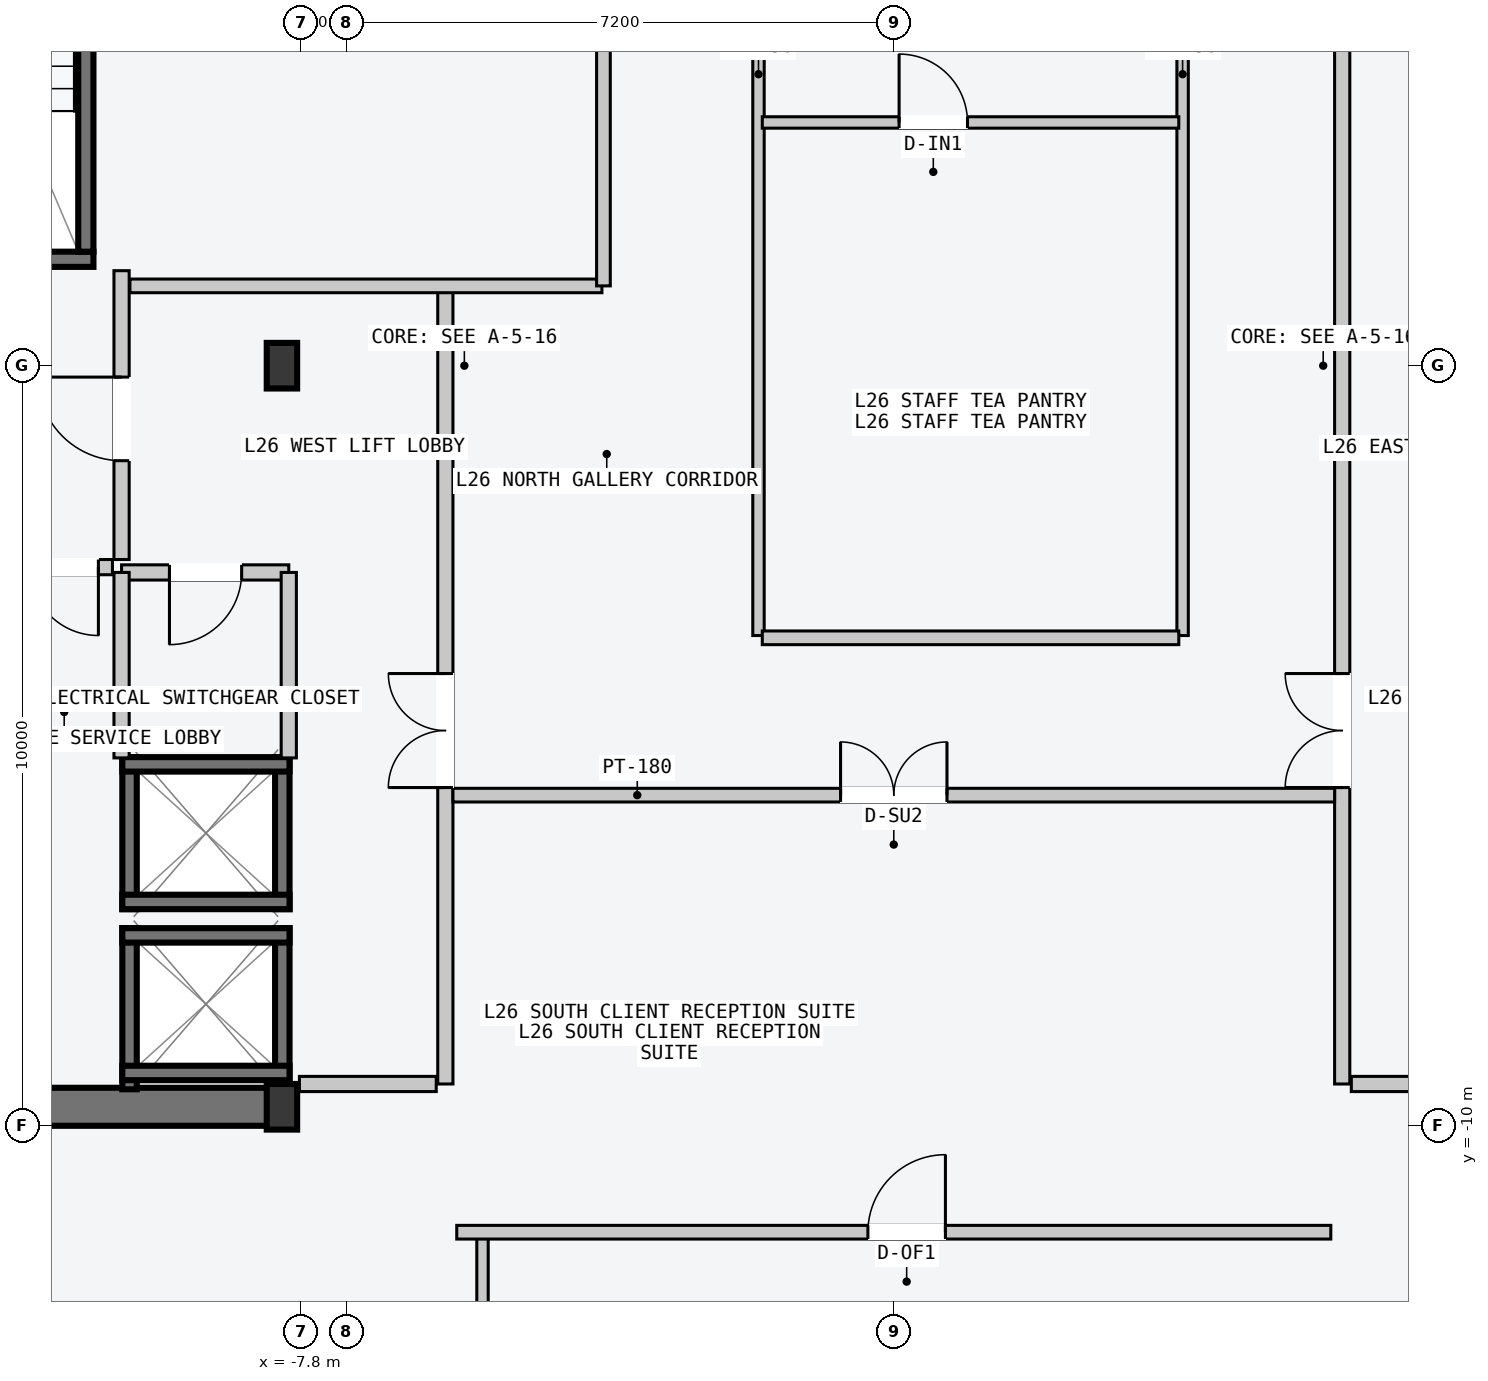
"""IFC4 building model, lengths in metres.
Left out: names, types, materials, properties, quantities, classifications, styles, units other than length and angle.
Written with IfcOpenShell. Run it as: python <this file> out.ifc"""

import sys

from ifc_helpers import new_model, si_unit, direction, frame, frame_2d, origin, origin_2d, place, context, subcontext, project, spatial, rectangle, i_section, extrude, element, fill, save


model = new_model("IFC4")
c1 = context("Model", 3, precision=1e-05, world=origin(), true_north=direction((0.0, 1.0)))
c2 = subcontext(c1, "Body", "Model", "MODEL_VIEW")
j1 = project(units=[si_unit("LENGTHUNIT", "METRE"), si_unit("PLANEANGLEUNIT", "RADIAN")], contexts=[c1])
p1 = place(None, origin())
s1 = spatial("IfcSite", under=j1, at=p1, CompositionType="ELEMENT")
p2 = place(p1, origin())
s2 = spatial("IfcBuilding", under=s1, at=p2, CompositionType="ELEMENT")
p3 = place(p2, frame((0.0, 0.0, 102.6)))
s3 = spatial("IfcBuildingStorey", under=s2, at=p3, CompositionType="ELEMENT", Elevation=102.6)
p4 = place(p3, frame((-14.53, -9.75, -0.2), z_axis=(0.0, 0.0, 1.0), x_axis=(1.0, 0.0, 0.0)))
e1 = element("IfcWall", 1, at=p4, inside=s3, PredefinedType="SHEAR", context=c2, shape_type="SweptSolid", body=[
    extrude(rectangle(XDim=6.46, YDim=0.5, at=frame_2d((3.23, 0.0))), origin(), (0.0, 0.0, 1.0), 3.6),
])
p5 = place(p3, frame((-14.25, 1.4, -0.2), z_axis=(0.0, 0.0, 1.0), x_axis=(1.0, 0.0, 0.0)))
e2 = element("IfcWall", 2, at=p5, inside=s3, PredefinedType="SOLIDWALL", context=c2, shape_type="SweptSolid", body=[
    extrude(rectangle(XDim=3.72, YDim=0.2, at=frame_2d((1.86, 0.0))), origin(), (0.0, 0.0, 1.0), 3.6),
])
p6 = place(p5, frame((1.5, 0.0, 0.2)))
e3 = element("IfcOpeningElement", 3, at=p6, cuts=e2, PredefinedType="OPENING", context=c2, shape_type="SweptSolid", body=[
    extrude(rectangle(XDim=1.12, YDim=2.18, at=frame_2d((0.56, 1.09))), frame((0.0, 0.11, 0.0), z_axis=(0.0, -1.0, 0.0), x_axis=(1.0, 0.0, 0.0)), (0.0, 0.0, 1.0), 0.22),
])
p7 = place(p3, frame((-10.63, 1.5, -0.2), z_axis=(0.0, 0.0, 1.0), x_axis=(0.0, 1.0, 0.0)))
e4 = element("IfcWall", 4, at=p7, inside=s3, PredefinedType="SOLIDWALL", context=c2, shape_type="SweptSolid", body=[
    extrude(rectangle(XDim=7.8, YDim=0.2, at=frame_2d((3.9, 0.0))), origin(), (0.0, 0.0, 1.0), 3.6),
])
for number, where, z_axis, x_axis in (
    (5, (-8.05, -9.75, 0.0), (0.0, 0.0, 1.0), (1.0, 0.0, 0.0)),
    (6, (-8.05, 0.0, 0.0), (0.0, 0.0, 1.0), (1.0, 0.0, 0.0)),
):
    element("IfcColumn", number, at=place(p3, frame(where, z_axis=z_axis, x_axis=x_axis)), inside=s3, PredefinedType="COLUMN", context=c2, shape_type="SweptSolid", body=[
        extrude(i_section(OverallWidth=0.4, OverallDepth=0.6, WebThickness=0.022, FlangeThickness=0.036, at=origin_2d()), origin(), (0.0, 0.0, 1.0), 3.6),
    ])
for number, where, z_axis, x_axis in (
    (7, (-8.045, -9.52, -0.2), (0.0, 0.0, 1.0), (0.0, 1.0, 0.0)),
    (8, (-10.055, -9.52, -0.2), (0.0, 0.0, 1.0), (0.0, 1.0, 0.0)),
):
    element("IfcWall", number, at=place(p3, frame(where, z_axis=z_axis, x_axis=x_axis)), inside=s3, PredefinedType="SOLIDWALL", context=c2, shape_type="SweptSolid", body=[
        extrude(rectangle(XDim=2.12, YDim=0.19, at=frame_2d((1.06, 0.0))), origin(), (0.0, 0.0, 1.0), 3.6),
    ])
for number, where, z_axis, x_axis in (
    (9, (-10.15, -7.495, -0.2), (0.0, 0.0, 1.0), (1.0, 0.0, 0.0)),
    (10, (-10.15, -9.305, -0.2), (0.0, 0.0, 1.0), (1.0, 0.0, 0.0)),
):
    element("IfcWall", number, at=place(p3, frame(where, z_axis=z_axis, x_axis=x_axis)), inside=s3, PredefinedType="SOLIDWALL", context=c2, shape_type="SweptSolid", body=[
        extrude(rectangle(XDim=2.2, YDim=0.19, at=frame_2d((1.1, 0.0))), origin(), (0.0, 0.0, 1.0), 3.6),
    ])
for number, where, z_axis, x_axis in (
    (11, (-8.045, -7.15, -0.2), (0.0, 0.0, 1.0), (0.0, 1.0, 0.0)),
    (12, (-10.055, -7.15, -0.2), (0.0, 0.0, 1.0), (0.0, 1.0, 0.0)),
):
    element("IfcWall", number, at=place(p3, frame(where, z_axis=z_axis, x_axis=x_axis)), inside=s3, PredefinedType="SOLIDWALL", context=c2, shape_type="SweptSolid", body=[
        extrude(rectangle(XDim=2.0, YDim=0.19, at=frame_2d((1.0, 0.0))), origin(), (0.0, 0.0, 1.0), 3.6),
    ])
for number, where, z_axis, x_axis in (
    (13, (-10.15, -5.245, -0.2), (0.0, 0.0, 1.0), (1.0, 0.0, 0.0)),
    (14, (-10.15, -7.055, -0.2), (0.0, 0.0, 1.0), (1.0, 0.0, 0.0)),
):
    element("IfcWall", number, at=place(p3, frame(where, z_axis=z_axis, x_axis=x_axis)), inside=s3, PredefinedType="SOLIDWALL", context=c2, shape_type="SweptSolid", body=[
        extrude(rectangle(XDim=2.2, YDim=0.19, at=frame_2d((1.1, 0.0))), origin(), (0.0, 0.0, 1.0), 3.6),
    ])
p8 = place(p3, frame((-5.9, -9.45, 0.0), z_axis=(0.0, 0.0, 1.0), x_axis=(0.0, 1.0, 0.0)))
e15 = element("IfcWall", 15, at=p8, inside=s3, PredefinedType="PARTITIONING", context=c2, shape_type="SweptSolid", body=[
    extrude(rectangle(XDim=10.5, YDim=0.2, at=frame_2d((5.25, 0.0))), origin(), (0.0, 0.0, 1.0), 3.4),
])
p9 = place(p8, frame((3.9, 0.0, 0.0)))
e16 = element("IfcOpeningElement", 16, at=p9, cuts=e15, PredefinedType="OPENING", context=c2, shape_type="SweptSolid", body=[
    extrude(rectangle(XDim=1.5, YDim=2.2, at=frame_2d((0.75, 1.1))), frame((0.0, 0.11, 0.0), z_axis=(0.0, -1.0, 0.0), x_axis=(1.0, 0.0, 0.0)), (0.0, 0.0, 1.0), 0.22),
])
p10 = place(p3, frame((-6.02, -9.45, 0.0), z_axis=(0.0, 0.0, 1.0), x_axis=(-1.0, 0.0, 0.0)))
e17 = element("IfcWall", 17, at=p10, inside=s3, PredefinedType="PARTITIONING", context=c2, shape_type="SweptSolid", body=[
    extrude(rectangle(XDim=1.8, YDim=0.2, at=frame_2d((0.9, 0.0))), origin(), (0.0, 0.0, 1.0), 3.4),
])
p11 = place(p3, frame((-10.16, -2.55, 0.0), z_axis=(0.0, 0.0, 1.0), x_axis=(0.0, 1.0, 0.0)))
e18 = element("IfcWall", 18, at=p11, inside=s3, PredefinedType="PARTITIONING", context=c2, shape_type="SweptSolid", body=[
    extrude(rectangle(XDim=3.8, YDim=0.2, at=frame_2d((1.9, 0.0))), origin(), (0.0, 0.0, 1.0), 3.4),
])
p12 = place(p11, frame((1.3, 0.0, 0.0)))
e19 = element("IfcOpeningElement", 19, at=p12, cuts=e18, PredefinedType="OPENING", context=c2, shape_type="SweptSolid", body=[
    extrude(rectangle(XDim=1.1, YDim=2.15, at=frame_2d((0.55, 1.075))), frame((0.0, 0.11, 0.0), z_axis=(0.0, -1.0, 0.0), x_axis=(1.0, 0.0, 0.0)), (0.0, 0.0, 1.0), 0.22),
])
p13 = place(p3, frame((-10.28, -2.65, 0.0), z_axis=(0.0, 0.0, 1.0), x_axis=(-1.0, 0.0, 0.0)))
e20 = element("IfcWall", 20, at=p13, inside=s3, PredefinedType="PARTITIONING", context=c2, shape_type="SweptSolid", body=[
    extrude(rectangle(XDim=1.27, YDim=0.2, at=frame_2d((0.635, 0.0))), origin(), (0.0, 0.0, 1.0), 3.4),
])
p14 = place(p13, frame((0.185, 0.0, 0.0)))
e21 = element("IfcOpeningElement", 21, at=p14, cuts=e20, PredefinedType="OPENING", context=c2, shape_type="SweptSolid", body=[
    extrude(rectangle(XDim=0.9, YDim=2.15, at=frame_2d((0.45, 1.075))), frame((0.0, 0.11, 0.0), z_axis=(0.0, -1.0, 0.0), x_axis=(1.0, 0.0, 0.0)), (0.0, 0.0, 1.0), 0.22),
])
p15 = place(p3, frame((-7.96, -2.72, 0.0), z_axis=(0.0, 0.0, 1.0), x_axis=(-1.0, 0.0, 0.0)))
e22 = element("IfcWall", 22, at=p15, inside=s3, PredefinedType="PARTITIONING", context=c2, shape_type="SweptSolid", body=[
    extrude(rectangle(XDim=2.2, YDim=0.2, at=frame_2d((1.1, 0.0))), origin(), (0.0, 0.0, 1.0), 3.4),
])
p16 = place(p15, frame((0.62, 0.0, 0.0)))
e23 = element("IfcOpeningElement", 23, at=p16, cuts=e22, PredefinedType="OPENING", context=c2, shape_type="SweptSolid", body=[
    extrude(rectangle(XDim=0.95, YDim=2.1, at=frame_2d((0.475, 1.05))), frame((0.0, 0.11, 0.0), z_axis=(0.0, -1.0, 0.0), x_axis=(1.0, 0.0, 0.0)), (0.0, 0.0, 1.0), 0.22),
])
for number, where, z_axis, x_axis in (
    (24, (-7.96, -5.16, 0.0), (0.0, 0.0, 1.0), (0.0, 1.0, 0.0)),
    (25, (-10.16, -5.16, 0.0), (0.0, 0.0, 1.0), (0.0, 1.0, 0.0)),
):
    element("IfcWall", number, at=place(p3, frame(where, z_axis=z_axis, x_axis=x_axis)), inside=s3, PredefinedType="PARTITIONING", context=c2, shape_type="SweptSolid", body=[
        extrude(rectangle(XDim=2.44, YDim=0.2, at=frame_2d((1.22, 0.0))), origin(), (0.0, 0.0, 1.0), 3.4),
    ])
p17 = place(p3, frame((5.9, -9.45, 0.0), z_axis=(0.0, 0.0, 1.0), x_axis=(0.0, 1.0, 0.0)))
e26 = element("IfcWall", 26, at=p17, inside=s3, PredefinedType="PARTITIONING", context=c2, shape_type="SweptSolid", body=[
    extrude(rectangle(XDim=18.9, YDim=0.2, at=frame_2d((9.45, 0.0))), origin(), (0.0, 0.0, 1.0), 3.4),
])
p18 = place(p17, frame((3.9, 0.0, 0.0)))
e27 = element("IfcOpeningElement", 27, at=p18, cuts=e26, PredefinedType="OPENING", context=c2, shape_type="SweptSolid", body=[
    extrude(rectangle(XDim=1.5, YDim=2.2, at=frame_2d((0.75, 1.1))), frame((0.0, 0.11, 0.0), z_axis=(0.0, -1.0, 0.0), x_axis=(1.0, 0.0, 0.0)), (0.0, 0.0, 1.0), 0.22),
])
p19 = place(p3, frame((6.02, -9.45, 0.0), z_axis=(0.0, 0.0, 1.0), x_axis=(1.0, 0.0, 0.0)))
e28 = element("IfcWall", 28, at=p19, inside=s3, PredefinedType="PARTITIONING", context=c2, shape_type="SweptSolid", body=[
    extrude(rectangle(XDim=1.8, YDim=0.2, at=frame_2d((0.9, 0.0))), origin(), (0.0, 0.0, 1.0), 3.4),
])
p20 = place(p3, frame((-10.05, 1.05, 0.0), z_axis=(0.0, 0.0, 1.0), x_axis=(1.0, 0.0, 0.0)))
e29 = element("IfcWall", 29, at=p20, inside=s3, PredefinedType="PARTITIONING", context=c2, shape_type="SweptSolid", body=[
    extrude(rectangle(XDim=6.21, YDim=0.18, at=frame_2d((3.105, 0.0))), origin(), (0.0, 0.0, 1.0), 3.4),
])
p21 = place(p3, frame((-3.82, 1.05, 0.0), z_axis=(0.0, 0.0, 1.0), x_axis=(0.0, 1.0, 0.0)))
e30 = element("IfcWall", 30, at=p21, inside=s3, PredefinedType="PARTITIONING", context=c2, shape_type="SweptSolid", body=[
    extrude(rectangle(XDim=10.17, YDim=0.18, at=frame_2d((5.085, 0.0))), origin(), (0.0, 0.0, 1.0), 3.4),
])
p22 = place(p21, frame((3.4, 0.0, 0.0)))
e31 = element("IfcOpeningElement", 31, at=p22, cuts=e30, PredefinedType="OPENING", context=c2, shape_type="SweptSolid", body=[
    extrude(rectangle(XDim=1.24, YDim=2.24, at=frame_2d((0.62, 1.12))), frame((0.0, 0.1, 0.0), z_axis=(0.0, -1.0, 0.0), x_axis=(1.0, 0.0, 0.0)), (0.0, 0.0, 1.0), 0.2),
])
for number, where, z_axis, x_axis in (
    (32, (-1.78, -3.55, 0.0), (0.0, 0.0, 1.0), (0.0, 1.0, 0.0)),
    (33, (3.8, -3.55, 0.0), (0.0, 0.0, 1.0), (0.0, 1.0, 0.0)),
):
    element("IfcWall", number, at=place(p3, frame(where, z_axis=z_axis, x_axis=x_axis)), inside=s3, PredefinedType="PARTITIONING", context=c2, shape_type="SweptSolid", body=[
        extrude(rectangle(XDim=14.77, YDim=0.15, at=frame_2d((7.385, 0.0))), origin(), (0.0, 0.0, 1.0), 3.4),
    ])
p23 = place(p3, frame((-1.73, -3.58, 0.0), z_axis=(0.0, 0.0, 1.0), x_axis=(1.0, 0.0, 0.0)))
e34 = element("IfcWall", 34, at=p23, inside=s3, PredefinedType="PARTITIONING", context=c2, shape_type="SweptSolid", body=[
    extrude(rectangle(XDim=5.48, YDim=0.18, at=frame_2d((2.74, 0.0))), origin(), (0.0, 0.0, 1.0), 3.4),
])
p24 = place(p3, frame((-1.73, 3.2, 0.0), z_axis=(0.0, 0.0, 1.0), x_axis=(1.0, 0.0, 0.0)))
e35 = element("IfcWall", 35, at=p24, inside=s3, PredefinedType="PARTITIONING", context=c2, shape_type="SweptSolid", body=[
    extrude(rectangle(XDim=5.48, YDim=0.15, at=frame_2d((2.74, 0.0))), origin(), (0.0, 0.0, 1.0), 3.4),
])
p25 = place(p24, frame((1.8, 0.0, 0.0)))
e36 = element("IfcOpeningElement", 36, at=p25, cuts=e35, PredefinedType="OPENING", context=c2, shape_type="SweptSolid", body=[
    extrude(rectangle(XDim=0.9, YDim=2.15, at=frame_2d((0.45, 1.075))), frame((0.0, 0.085, 0.0), z_axis=(0.0, -1.0, 0.0), x_axis=(1.0, 0.0, 0.0)), (0.0, 0.0, 1.0), 0.17),
])
p26 = place(p3, frame((-5.8, -5.65, 0.0), z_axis=(0.0, 0.0, 1.0), x_axis=(1.0, 0.0, 0.0)))
e37 = element("IfcWall", 37, at=p26, inside=s3, PredefinedType="PARTITIONING", context=c2, shape_type="SweptSolid", body=[
    extrude(rectangle(XDim=11.6, YDim=0.18, at=frame_2d((5.8, 0.0))), origin(), (0.0, 0.0, 1.0), 3.4),
])
p27 = place(p26, frame((5.1, 0.0, 0.0)))
e38 = element("IfcOpeningElement", 38, at=p27, cuts=e37, PredefinedType="OPENING", context=c2, shape_type="SweptSolid", body=[
    extrude(rectangle(XDim=1.4, YDim=2.2, at=frame_2d((0.7, 1.1))), frame((0.0, 0.1, 0.0), z_axis=(0.0, -1.0, 0.0), x_axis=(1.0, 0.0, 0.0)), (0.0, 0.0, 1.0), 0.2),
])
p28 = place(p3, frame((-5.411, -19.56, 0.0), z_axis=(0.0, 0.0, 1.0), x_axis=(0.0, 1.0, 0.0)))
e39 = element("IfcWall", 39, at=p28, inside=s3, PredefinedType="PARTITIONING", context=c2, shape_type="SweptSolid", body=[
    extrude(rectangle(XDim=8.1, YDim=0.15, at=frame_2d((4.05, 0.0))), origin(), (0.0, 0.0, 1.0), 3.4),
])
p29 = place(p28, frame((1.05, 0.0, 0.0)))
e40 = element("IfcOpeningElement", 40, at=p29, cuts=e39, PredefinedType="OPENING", context=c2, shape_type="SweptSolid", body=[
    extrude(rectangle(XDim=0.96, YDim=2.18, at=frame_2d((0.48, 1.09))), frame((0.0, 0.085, 0.0), z_axis=(0.0, -1.0, 0.0), x_axis=(1.0, 0.0, 0.0)), (0.0, 0.0, 1.0), 0.17),
])
p30 = place(p3, frame((-5.75, -11.4, 0.0), z_axis=(0.0, 0.0, 1.0), x_axis=(1.0, 0.0, 0.0)))
e41 = element("IfcWall", 41, at=p30, inside=s3, PredefinedType="PARTITIONING", context=c2, shape_type="SweptSolid", body=[
    extrude(rectangle(XDim=11.5, YDim=0.18, at=frame_2d((5.75, 0.0))), origin(), (0.0, 0.0, 1.0), 3.4),
])
p31 = place(p30, frame((5.409, 0.0, 0.0)))
e42 = element("IfcOpeningElement", 42, at=p31, cuts=e41, PredefinedType="OPENING", context=c2, shape_type="SweptSolid", body=[
    extrude(rectangle(XDim=1.02, YDim=2.2, at=frame_2d((0.51, 1.1))), frame((0.0, 0.1, 0.0), z_axis=(0.0, -1.0, 0.0), x_axis=(1.0, 0.0, 0.0)), (0.0, 0.0, 1.0), 0.2),
])
p32 = place(p9, origin())
e43 = element("IfcDoor", 43, at=p32, inside=s3, OperationType="DOUBLE_DOOR_SINGLE_SWING", PredefinedType="DOOR", context=c2, shape_type="SweptSolid", body=[
    extrude(rectangle(XDim=1.5, YDim=2.2, at=frame_2d((0.75, 1.1))), frame((0.0, 0.025, 0.0), z_axis=(0.0, -1.0, 0.0), x_axis=(1.0, 0.0, 0.0)), (0.0, 0.0, 1.0), 0.05),
])
fill(e16, e43)
p33 = place(p12, origin())
e44 = element("IfcDoor", 44, at=p33, inside=s3, OperationType="SINGLE_SWING_RIGHT", PredefinedType="DOOR", context=c2, shape_type="SweptSolid", body=[
    extrude(rectangle(XDim=1.1, YDim=2.15, at=frame_2d((0.55, 1.075))), frame((0.0, 0.025, 0.0), z_axis=(0.0, -1.0, 0.0), x_axis=(1.0, 0.0, 0.0)), (0.0, 0.0, 1.0), 0.05),
])
fill(e19, e44)
p34 = place(p14, origin())
e45 = element("IfcDoor", 45, at=p34, inside=s3, OperationType="SINGLE_SWING_LEFT", PredefinedType="DOOR", context=c2, shape_type="SweptSolid", body=[
    extrude(rectangle(XDim=0.9, YDim=2.15, at=frame_2d((0.45, 1.075))), frame((0.0, 0.025, 0.0), z_axis=(0.0, -1.0, 0.0), x_axis=(1.0, 0.0, 0.0)), (0.0, 0.0, 1.0), 0.05),
])
fill(e21, e45)
p35 = place(p16, origin())
e46 = element("IfcDoor", 46, at=p35, inside=s3, OperationType="SINGLE_SWING_RIGHT", PredefinedType="DOOR", context=c2, shape_type="SweptSolid", body=[
    extrude(rectangle(XDim=0.95, YDim=2.1, at=frame_2d((0.475, 1.05))), frame((0.0, 0.025, 0.0), z_axis=(0.0, -1.0, 0.0), x_axis=(1.0, 0.0, 0.0)), (0.0, 0.0, 1.0), 0.05),
])
fill(e23, e46)
p36 = place(p18, origin())
e47 = element("IfcDoor", 47, at=p36, inside=s3, OperationType="DOUBLE_DOOR_SINGLE_SWING", PredefinedType="DOOR", context=c2, shape_type="SweptSolid", body=[
    extrude(rectangle(XDim=1.5, YDim=2.2, at=frame_2d((0.75, 1.1))), frame((0.0, 0.025, 0.0), z_axis=(0.0, -1.0, 0.0), x_axis=(1.0, 0.0, 0.0)), (0.0, 0.0, 1.0), 0.05),
])
fill(e27, e47)
p37 = place(p25, origin())
e48 = element("IfcDoor", 48, at=p37, inside=s3, OperationType="SINGLE_SWING_LEFT", PredefinedType="DOOR", context=c2, shape_type="SweptSolid", body=[
    extrude(rectangle(XDim=0.9, YDim=2.15, at=frame_2d((0.45, 1.075))), frame((0.0, 0.025, 0.0), z_axis=(0.0, -1.0, 0.0), x_axis=(1.0, 0.0, 0.0)), (0.0, 0.0, 1.0), 0.05),
])
fill(e36, e48)
p38 = place(p27, origin())
e49 = element("IfcDoor", 49, at=p38, inside=s3, OperationType="DOUBLE_DOOR_SINGLE_SWING", PredefinedType="DOOR", context=c2, shape_type="SweptSolid", body=[
    extrude(rectangle(XDim=1.4, YDim=2.2, at=frame_2d((0.7, 1.1))), frame((0.0, 0.025, 0.0), z_axis=(0.0, -1.0, 0.0), x_axis=(1.0, 0.0, 0.0)), (0.0, 0.0, 1.0), 0.05),
])
fill(e38, e49)
p39 = place(p31, origin())
e50 = element("IfcDoor", 50, at=p39, inside=s3, OperationType="SINGLE_SWING_RIGHT", PredefinedType="DOOR", context=c2, shape_type="SweptSolid", body=[
    extrude(rectangle(XDim=1.02, YDim=2.2, at=frame_2d((0.51, 1.1))), frame((0.0, 0.025, 0.0), z_axis=(0.0, -1.0, 0.0), x_axis=(1.0, 0.0, 0.0)), (0.0, 0.0, 1.0), 0.05),
])
fill(e42, e50)
save(model, sys.argv[1])
